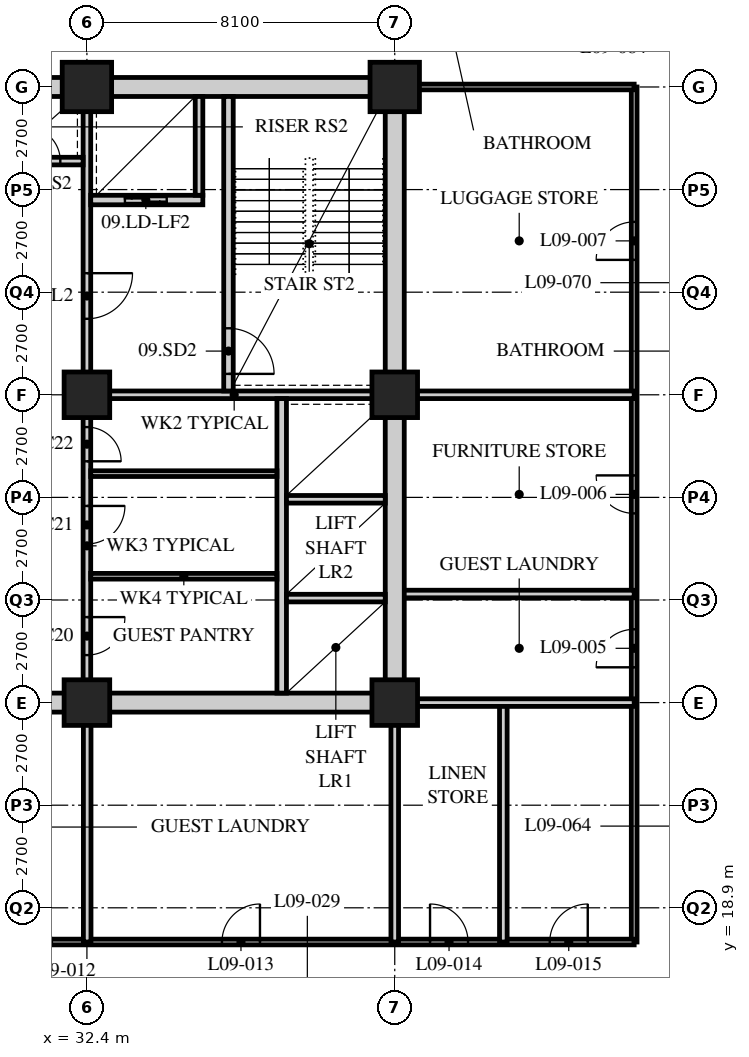
"""IFC4 building model, lengths in metres.
Left out: names, types, materials, properties, quantities, classifications, styles, units other than length and angle.
Written with IfcOpenShell. Run it as: python <this file> out.ifc"""

import sys

from ifc_helpers import new_model, si_unit, direction, frame, frame_2d, origin, origin_2d, place, context, subcontext, project, spatial, rectangle, hollow_rectangle, extrude, element, fill, save


model = new_model("IFC4")
c1 = context("Model", 3, precision=1e-05, world=origin(), true_north=direction((0.0, 1.0)))
c2 = subcontext(c1, "Body", "Model", "MODEL_VIEW")
j1 = project(units=[si_unit("LENGTHUNIT", "METRE"), si_unit("PLANEANGLEUNIT", "RADIAN")], contexts=[c1])
p1 = place(None, origin())
s1 = spatial("IfcSite", under=j1, at=p1, CompositionType="ELEMENT")
p2 = place(p1, origin())
s2 = spatial("IfcBuilding", under=s1, at=p2, CompositionType="ELEMENT")
p3 = place(p2, frame((0.0, 0.0, 43.2)))
s3 = spatial("IfcBuildingStorey", under=s2, at=p3, CompositionType="ELEMENT", Elevation=43.2)
for number, where, z_axis, x_axis in (
    (1, (32.4, 24.3, 0.0), (0.0, 0.0, 1.0), (1.0, 0.0, 0.0)),
    (2, (32.4, 32.4, 0.0), (0.0, 0.0, 1.0), (1.0, 0.0, 0.0)),
):
    element("IfcColumn", number, at=place(p3, frame(where, z_axis=z_axis, x_axis=x_axis)), inside=s3, PredefinedType="COLUMN", context=c2, shape_type="SweptSolid", body=[
        extrude(hollow_rectangle(XDim=1.2, YDim=1.2, WallThickness=0.12, at=origin_2d()), origin(), (0.0, 0.0, 1.0), 3.4),
    ])
p4 = place(p3, frame((32.4, 40.5, 0.0), z_axis=(0.0, 0.0, 1.0), x_axis=(1.0, 0.0, 0.0)))
e3 = element("IfcColumn", 3, at=p4, inside=s3, PredefinedType="COLUMN", context=c2, shape_type="SweptSolid", body=[
    extrude(hollow_rectangle(XDim=1.3, YDim=1.3, WallThickness=0.13, at=origin_2d()), origin(), (0.0, 0.0, 1.0), 3.4),
])
for number, where, z_axis, x_axis in (
    (4, (40.5, 24.3, 0.0), (0.0, 0.0, 1.0), (1.0, 0.0, 0.0)),
    (5, (40.5, 32.4, 0.0), (0.0, 0.0, 1.0), (1.0, 0.0, 0.0)),
):
    element("IfcColumn", number, at=place(p3, frame(where, z_axis=z_axis, x_axis=x_axis)), inside=s3, PredefinedType="COLUMN", context=c2, shape_type="SweptSolid", body=[
        extrude(hollow_rectangle(XDim=1.2, YDim=1.2, WallThickness=0.12, at=origin_2d()), origin(), (0.0, 0.0, 1.0), 3.4),
    ])
p5 = place(p3, frame((40.5, 40.5, 0.0), z_axis=(0.0, 0.0, 1.0), x_axis=(1.0, 0.0, 0.0)))
e6 = element("IfcColumn", 6, at=p5, inside=s3, PredefinedType="COLUMN", context=c2, shape_type="SweptSolid", body=[
    extrude(hollow_rectangle(XDim=1.3, YDim=1.3, WallThickness=0.13, at=origin_2d()), origin(), (0.0, 0.0, 1.0), 3.4),
])
p6 = place(p3, frame((46.8, 18.0, 0.0), z_axis=(0.0, 0.0, 1.0), x_axis=(0.0, 1.0, 0.0)))
e7 = element("IfcWall", 7, at=p6, inside=s3, PredefinedType="PARTITIONING", context=c2, shape_type="SweptSolid", body=[
    extrude(rectangle(XDim=22.5, YDim=0.15, at=frame_2d((11.25, 0.0))), origin(), (0.0, 0.0, 1.0), 3.19),
])
p7 = place(p6, frame((7.229, 0.0, 0.0)))
e8 = element("IfcOpeningElement", 8, at=p7, cuts=e7, PredefinedType="OPENING", context=c2, shape_type="SweptSolid", body=[
    extrude(rectangle(XDim=1.0, YDim=2.1, at=frame_2d((0.5, 1.05))), frame((0.0, 0.085, 0.0), z_axis=(0.0, -1.0, 0.0), x_axis=(1.0, 0.0, 0.0)), (0.0, 0.0, 1.0), 0.17),
])
p8 = place(p6, frame((11.279, 0.0, 0.0)))
e9 = element("IfcOpeningElement", 9, at=p8, cuts=e7, PredefinedType="OPENING", context=c2, shape_type="SweptSolid", body=[
    extrude(rectangle(XDim=1.0, YDim=2.1, at=frame_2d((0.5, 1.05))), frame((0.0, 0.085, 0.0), z_axis=(0.0, -1.0, 0.0), x_axis=(1.0, 0.0, 0.0)), (0.0, 0.0, 1.0), 0.17),
])
p9 = place(p6, frame((17.95, 0.0, 0.0)))
e10 = element("IfcOpeningElement", 10, at=p9, cuts=e7, PredefinedType="OPENING", context=c2, shape_type="SweptSolid", body=[
    extrude(rectangle(XDim=1.0, YDim=2.1, at=frame_2d((0.5, 1.05))), frame((0.0, 0.085, 0.0), z_axis=(0.0, -1.0, 0.0), x_axis=(1.0, 0.0, 0.0)), (0.0, 0.0, 1.0), 0.17),
])
p10 = place(p3, frame((46.8, 40.5, 0.0), z_axis=(0.0, 0.0, 1.0), x_axis=(-1.0, 0.0, 0.0)))
e11 = element("IfcWall", 11, at=p10, inside=s3, PredefinedType="PARTITIONING", context=c2, shape_type="SweptSolid", body=[
    extrude(rectangle(XDim=6.1, YDim=0.15, at=frame_2d((3.05, 0.0))), origin(), (0.0, 0.0, 1.0), 2.578),
])
p11 = place(p3, frame((29.56, 18.0, 0.0), z_axis=(0.0, 0.0, 1.0), x_axis=(1.0, 0.0, 0.0)))
e12 = element("IfcWall", 12, at=p11, inside=s3, PredefinedType="PARTITIONING", context=c2, shape_type="SweptSolid", body=[
    extrude(rectangle(XDim=17.24, YDim=0.15, at=frame_2d((8.62, 0.0))), origin(), (0.0, 0.0, 1.0), 3.19),
])
p12 = place(p11, frame((0.919, 0.0, 0.0)))
e13 = element("IfcOpeningElement", 13, at=p12, cuts=e12, PredefinedType="OPENING", context=c2, shape_type="SweptSolid", body=[
    extrude(rectangle(XDim=1.0, YDim=2.1, at=frame_2d((0.5, 1.05))), frame((0.0, 0.085, 0.0), z_axis=(0.0, -1.0, 0.0), x_axis=(1.0, 0.0, 0.0)), (0.0, 0.0, 1.0), 0.17),
])
p13 = place(p11, frame((6.394, 0.0, 0.0)))
e14 = element("IfcOpeningElement", 14, at=p13, cuts=e12, PredefinedType="OPENING", context=c2, shape_type="SweptSolid", body=[
    extrude(rectangle(XDim=1.0, YDim=2.1, at=frame_2d((0.5, 1.05))), frame((0.0, 0.085, 0.0), z_axis=(0.0, -1.0, 0.0), x_axis=(1.0, 0.0, 0.0)), (0.0, 0.0, 1.0), 0.17),
])
p14 = place(p11, frame((11.869, 0.0, 0.0)))
e15 = element("IfcOpeningElement", 15, at=p14, cuts=e12, PredefinedType="OPENING", context=c2, shape_type="SweptSolid", body=[
    extrude(rectangle(XDim=1.0, YDim=2.1, at=frame_2d((0.5, 1.05))), frame((0.0, 0.085, 0.0), z_axis=(0.0, -1.0, 0.0), x_axis=(1.0, 0.0, 0.0)), (0.0, 0.0, 1.0), 0.17),
])
p15 = place(p11, frame((15.019, 0.0, 0.0)))
e16 = element("IfcOpeningElement", 16, at=p15, cuts=e12, PredefinedType="OPENING", context=c2, shape_type="SweptSolid", body=[
    extrude(rectangle(XDim=1.0, YDim=2.1, at=frame_2d((0.5, 1.05))), frame((0.0, 0.085, 0.0), z_axis=(0.0, -1.0, 0.0), x_axis=(1.0, 0.0, 0.0)), (0.0, 0.0, 1.0), 0.17),
])
p16 = place(p3, frame((40.5, 32.4, 0.0), z_axis=(0.0, 0.0, 1.0), x_axis=(1.0, 0.0, 0.0)))
e17 = element("IfcWall", 17, at=p16, inside=s3, PredefinedType="SOLIDWALL", context=c2, shape_type="SweptSolid", body=[
    extrude(rectangle(XDim=6.3, YDim=0.2, at=frame_2d((3.15, 0.0))), origin(), (0.0, 0.0, 1.0), 2.578),
])
p17 = place(p3, frame((46.8, 27.157, 0.0), z_axis=(0.0, 0.0, 1.0), x_axis=(-1.0, 0.0, 0.0)))
e18 = element("IfcWall", 18, at=p17, inside=s3, PredefinedType="SOLIDWALL", context=c2, shape_type="SweptSolid", body=[
    extrude(rectangle(XDim=6.3, YDim=0.2, at=frame_2d((3.15, 0.0))), origin(), (0.0, 0.0, 1.0), 3.19),
])
for number, where, z_axis, x_axis in (
    (19, (40.5, 18.0, 0.0), (0.0, 0.0, 1.0), (0.0, 1.0, 0.0)),
    (20, (32.407, 18.0, 0.0), (0.0, 0.0, 1.0), (0.0, 1.0, 0.0)),
):
    element("IfcWall", number, at=place(p3, frame(where, z_axis=z_axis, x_axis=x_axis)), inside=s3, PredefinedType="SOLIDWALL", context=c2, shape_type="SweptSolid", body=[
        extrude(rectangle(XDim=6.3, YDim=0.2, at=frame_2d((3.15, 0.0))), origin(), (0.0, 0.0, 1.0), 2.578),
    ])
p18 = place(p3, frame((43.357, 18.0, 0.0), z_axis=(0.0, 0.0, 1.0), x_axis=(0.0, 1.0, 0.0)))
e21 = element("IfcWall", 21, at=p18, inside=s3, PredefinedType="SOLIDWALL", context=c2, shape_type="SweptSolid", body=[
    extrude(rectangle(XDim=6.3, YDim=0.2, at=frame_2d((3.15, 0.0))), origin(), (0.0, 0.0, 1.0), 3.19),
])
p19 = place(p3, frame((40.5, 24.3, 0.0), z_axis=(0.0, 0.0, 1.0), x_axis=(1.0, 0.0, 0.0)))
e22 = element("IfcWall", 22, at=p19, inside=s3, PredefinedType="SOLIDWALL", context=c2, shape_type="SweptSolid", body=[
    extrude(rectangle(XDim=6.3, YDim=0.2, at=frame_2d((3.15, 0.0))), origin(), (0.0, 0.0, 1.0), 2.578),
])
p20 = place(p3, frame((15.95, 24.3, 0.0), z_axis=(0.0, 0.0, 1.0), x_axis=(1.0, 0.0, 0.0)))
e23 = element("IfcWall", 23, at=p20, inside=s3, PredefinedType="SOLIDWALL", context=c2, shape_type="SweptSolid", body=[
    extrude(rectangle(XDim=24.8, YDim=0.5, at=frame_2d((12.4, 0.0))), origin(), (0.0, 0.0, 1.0), 2.54),
])
p21 = place(p20, frame((11.5, 0.0, 0.0)))
e24 = element("IfcOpeningElement", 24, at=p21, cuts=e23, PredefinedType="OPENING", context=c2, shape_type="SweptSolid", body=[
    extrude(rectangle(XDim=1.8, YDim=2.4, at=frame_2d((0.9, 1.2))), frame((0.0, 0.26, 0.0), z_axis=(0.0, -1.0, 0.0), x_axis=(1.0, 0.0, 0.0)), (0.0, 0.0, 1.0), 0.52),
])
p22 = place(p3, frame((15.95, 40.5, 0.0), z_axis=(0.0, 0.0, 1.0), x_axis=(1.0, 0.0, 0.0)))
e25 = element("IfcWall", 25, at=p22, inside=s3, PredefinedType="SOLIDWALL", context=c2, shape_type="SweptSolid", body=[
    extrude(rectangle(XDim=24.8, YDim=0.5, at=frame_2d((12.4, 0.0))), origin(), (0.0, 0.0, 1.0), 2.54),
])
p23 = place(p22, frame((11.5, 0.0, 0.0)))
e26 = element("IfcOpeningElement", 26, at=p23, cuts=e25, PredefinedType="OPENING", context=c2, shape_type="SweptSolid", body=[
    extrude(rectangle(XDim=1.8, YDim=2.4, at=frame_2d((0.9, 1.2))), frame((0.0, 0.26, 0.0), z_axis=(0.0, -1.0, 0.0), x_axis=(1.0, 0.0, 0.0)), (0.0, 0.0, 1.0), 0.52),
])
p24 = place(p3, frame((40.5, 24.55, 0.0), z_axis=(0.0, 0.0, 1.0), x_axis=(0.0, 1.0, 0.0)))
e27 = element("IfcWall", 27, at=p24, inside=s3, PredefinedType="SOLIDWALL", context=c2, shape_type="SweptSolid", body=[
    extrude(rectangle(XDim=15.7, YDim=0.5, at=frame_2d((7.85, 0.0))), origin(), (0.0, 0.0, 1.0), 2.578),
])
p25 = place(p3, frame((32.3, 32.4, 0.0), z_axis=(0.0, 0.0, 1.0), x_axis=(1.0, 0.0, 0.0)))
e28 = element("IfcWall", 28, at=p25, inside=s3, PredefinedType="SOLIDWALL", context=c2, shape_type="SweptSolid", body=[
    extrude(rectangle(XDim=7.95, YDim=0.2, at=frame_2d((3.975, 0.0))), origin(), (0.0, 0.0, 1.0), 2.578),
])
p26 = place(p3, frame((32.4, 32.5, 0.0), z_axis=(0.0, 0.0, 1.0), x_axis=(0.0, 1.0, 0.0)))
e29 = element("IfcWall", 29, at=p26, inside=s3, PredefinedType="SOLIDWALL", context=c2, shape_type="SweptSolid", body=[
    extrude(rectangle(XDim=7.75, YDim=0.2, at=frame_2d((3.875, 0.0))), origin(), (0.0, 0.0, 1.0), 2.578),
])
p27 = place(p26, frame((1.9, 0.0, 0.0)))
e30 = element("IfcOpeningElement", 30, at=p27, cuts=e29, PredefinedType="OPENING", context=c2, shape_type="SweptSolid", body=[
    extrude(rectangle(XDim=1.2, YDim=2.1, at=frame_2d((0.6, 1.05))), frame((0.0, 0.11, 0.0), z_axis=(0.0, -1.0, 0.0), x_axis=(1.0, 0.0, 0.0)), (0.0, 0.0, 1.0), 0.22),
])
p28 = place(p3, frame((37.525, 24.55, 0.0), z_axis=(0.0, 0.0, 1.0), x_axis=(0.0, 1.0, 0.0)))
e31 = element("IfcWall", 31, at=p28, inside=s3, PredefinedType="SOLIDWALL", context=c2, shape_type="SweptSolid", body=[
    extrude(rectangle(XDim=7.75, YDim=0.25, at=frame_2d((3.875, 0.0))), origin(), (0.0, 0.0, 1.0), 3.19),
])
for number, where, z_axis, x_axis in (
    (32, (37.65, 27.05, 0.0), (0.0, 0.0, 1.0), (1.0, 0.0, 0.0)),
    (33, (37.65, 29.65, 0.0), (0.0, 0.0, 1.0), (1.0, 0.0, 0.0)),
):
    element("IfcWall", number, at=place(p3, frame(where, z_axis=z_axis, x_axis=x_axis)), inside=s3, PredefinedType="SOLIDWALL", context=c2, shape_type="SweptSolid", body=[
        extrude(rectangle(XDim=2.6, YDim=0.2, at=frame_2d((1.3, 0.0))), origin(), (0.0, 0.0, 1.0), 3.19),
    ])
p29 = place(p3, frame((36.125, 32.5, 0.0), z_axis=(0.0, 0.0, 1.0), x_axis=(0.0, 1.0, 0.0)))
e34 = element("IfcWall", 34, at=p29, inside=s3, PredefinedType="SOLIDWALL", context=c2, shape_type="SweptSolid", body=[
    extrude(rectangle(XDim=7.75, YDim=0.25, at=frame_2d((3.875, 0.0))), origin(), (0.0, 0.0, 1.0), 3.19),
])
p30 = place(p29, frame((0.45, 0.0, 0.0)))
e35 = element("IfcOpeningElement", 35, at=p30, cuts=e34, PredefinedType="OPENING", context=c2, shape_type="SweptSolid", body=[
    extrude(rectangle(XDim=1.2, YDim=2.1, at=frame_2d((0.6, 1.05))), frame((0.0, 0.135, 0.0), z_axis=(0.0, -1.0, 0.0), x_axis=(1.0, 0.0, 0.0)), (0.0, 0.0, 1.0), 0.27),
])
p31 = place(p3, frame((32.5, 37.525, 0.0), z_axis=(0.0, 0.0, 1.0), x_axis=(1.0, 0.0, 0.0)))
e36 = element("IfcWall", 36, at=p31, inside=s3, PredefinedType="SOLIDWALL", context=c2, shape_type="SweptSolid", body=[
    extrude(rectangle(XDim=2.95, YDim=0.25, at=frame_2d((1.475, 0.0))), origin(), (0.0, 0.0, 1.0), 3.19),
])
p32 = place(p31, frame((0.9, 0.0, 0.0)))
e37 = element("IfcOpeningElement", 37, at=p32, cuts=e36, PredefinedType="OPENING", context=c2, shape_type="SweptSolid", body=[
    extrude(rectangle(XDim=1.1, YDim=2.4, at=frame_2d((0.55, 1.2))), frame((0.0, 0.135, 0.0), z_axis=(0.0, -1.0, 0.0), x_axis=(1.0, 0.0, 0.0)), (0.0, 0.0, 1.0), 0.27),
])
p33 = place(p3, frame((35.35, 37.65, 0.0), z_axis=(0.0, 0.0, 1.0), x_axis=(0.0, 1.0, 0.0)))
e38 = element("IfcWall", 38, at=p33, inside=s3, PredefinedType="SOLIDWALL", context=c2, shape_type="SweptSolid", body=[
    extrude(rectangle(XDim=2.6, YDim=0.2, at=frame_2d((1.3, 0.0))), origin(), (0.0, 0.0, 1.0), 3.19),
])
p34 = place(p3, frame((30.15, 38.55, 0.0), z_axis=(0.0, 0.0, 1.0), x_axis=(1.0, 0.0, 0.0)))
e39 = element("IfcWall", 39, at=p34, inside=s3, PredefinedType="SOLIDWALL", context=c2, shape_type="SweptSolid", body=[
    extrude(rectangle(XDim=2.15, YDim=0.2, at=frame_2d((1.075, 0.0))), origin(), (0.0, 0.0, 1.0), 3.19),
])
p35 = place(p34, frame((0.65, 0.0, 0.0)))
e40 = element("IfcOpeningElement", 40, at=p35, cuts=e39, PredefinedType="OPENING", context=c2, shape_type="SweptSolid", body=[
    extrude(rectangle(XDim=0.9, YDim=2.1, at=frame_2d((0.45, 1.05))), frame((0.0, 0.11, 0.0), z_axis=(0.0, -1.0, 0.0), x_axis=(1.0, 0.0, 0.0)), (0.0, 0.0, 1.0), 0.22),
])
p36 = place(p3, frame((32.4, 24.55, 0.0), z_axis=(0.0, 0.0, 1.0), x_axis=(0.0, 1.0, 0.0)))
e41 = element("IfcWall", 41, at=p36, inside=s3, PredefinedType="PARTITIONING", context=c2, shape_type="SweptSolid", body=[
    extrude(rectangle(XDim=7.75, YDim=0.2, at=frame_2d((3.875, 0.0))), origin(), (0.0, 0.0, 1.0), 2.578),
])
p37 = place(p36, frame((1.0, 0.0, 0.0)))
e42 = element("IfcOpeningElement", 42, at=p37, cuts=e41, PredefinedType="OPENING", context=c2, shape_type="SweptSolid", body=[
    extrude(rectangle(XDim=1.0, YDim=2.1, at=frame_2d((0.5, 1.05))), frame((0.0, 0.11, 0.0), z_axis=(0.0, -1.0, 0.0), x_axis=(1.0, 0.0, 0.0)), (0.0, 0.0, 1.0), 0.22),
])
p38 = place(p36, frame((3.925, 0.0, 0.0)))
e43 = element("IfcOpeningElement", 43, at=p38, cuts=e41, PredefinedType="OPENING", context=c2, shape_type="SweptSolid", body=[
    extrude(rectangle(XDim=1.0, YDim=2.1, at=frame_2d((0.5, 1.05))), frame((0.0, 0.11, 0.0), z_axis=(0.0, -1.0, 0.0), x_axis=(1.0, 0.0, 0.0)), (0.0, 0.0, 1.0), 0.22),
])
p39 = place(p36, frame((6.1, 0.0, 0.0)))
e44 = element("IfcOpeningElement", 44, at=p39, cuts=e41, PredefinedType="OPENING", context=c2, shape_type="SweptSolid", body=[
    extrude(rectangle(XDim=0.9, YDim=2.1, at=frame_2d((0.45, 1.05))), frame((0.0, 0.11, 0.0), z_axis=(0.0, -1.0, 0.0), x_axis=(1.0, 0.0, 0.0)), (0.0, 0.0, 1.0), 0.22),
])
for number, where, z_axis, x_axis in (
    (45, (32.5, 27.625, 0.0), (0.0, 0.0, 1.0), (1.0, 0.0, 0.0)),
    (46, (32.5, 30.325, 0.0), (0.0, 0.0, 1.0), (1.0, 0.0, 0.0)),
):
    element("IfcWall", number, at=place(p3, frame(where, z_axis=z_axis, x_axis=x_axis)), inside=s3, PredefinedType="PARTITIONING", context=c2, shape_type="SweptSolid", body=[
        extrude(rectangle(XDim=4.9, YDim=0.15, at=frame_2d((2.45, 0.0))), origin(), (0.0, 0.0, 1.0), 3.19),
    ])
p40 = place(p7, origin())
e47 = element("IfcDoor", 47, at=p40, inside=s3, OperationType="SINGLE_SWING_LEFT", PredefinedType="DOOR", context=c2, shape_type="SweptSolid", body=[
    extrude(rectangle(XDim=1.0, YDim=2.1, at=frame_2d((0.5, 1.05))), frame((0.0, 0.025, 0.0), z_axis=(0.0, -1.0, 0.0), x_axis=(1.0, 0.0, 0.0)), (0.0, 0.0, 1.0), 0.05),
])
fill(e8, e47)
p41 = place(p8, origin())
e48 = element("IfcDoor", 48, at=p41, inside=s3, OperationType="SINGLE_SWING_RIGHT", PredefinedType="DOOR", context=c2, shape_type="SweptSolid", body=[
    extrude(rectangle(XDim=1.0, YDim=2.1, at=frame_2d((0.5, 1.05))), frame((0.0, 0.025, 0.0), z_axis=(0.0, -1.0, 0.0), x_axis=(1.0, 0.0, 0.0)), (0.0, 0.0, 1.0), 0.05),
])
fill(e9, e48)
p42 = place(p9, origin())
e49 = element("IfcDoor", 49, at=p42, inside=s3, OperationType="SINGLE_SWING_LEFT", PredefinedType="DOOR", context=c2, shape_type="SweptSolid", body=[
    extrude(rectangle(XDim=1.0, YDim=2.1, at=frame_2d((0.5, 1.05))), frame((0.0, 0.025, 0.0), z_axis=(0.0, -1.0, 0.0), x_axis=(1.0, 0.0, 0.0)), (0.0, 0.0, 1.0), 0.05),
])
fill(e10, e49)
p43 = place(p13, origin())
e50 = element("IfcDoor", 50, at=p43, inside=s3, OperationType="SINGLE_SWING_RIGHT", PredefinedType="DOOR", context=c2, shape_type="SweptSolid", body=[
    extrude(rectangle(XDim=1.0, YDim=2.1, at=frame_2d((0.5, 1.05))), frame((0.0, 0.025, 0.0), z_axis=(0.0, -1.0, 0.0), x_axis=(1.0, 0.0, 0.0)), (0.0, 0.0, 1.0), 0.05),
])
fill(e14, e50)
p44 = place(p14, origin())
e51 = element("IfcDoor", 51, at=p44, inside=s3, OperationType="SINGLE_SWING_LEFT", PredefinedType="DOOR", context=c2, shape_type="SweptSolid", body=[
    extrude(rectangle(XDim=1.0, YDim=2.1, at=frame_2d((0.5, 1.05))), frame((0.0, 0.025, 0.0), z_axis=(0.0, -1.0, 0.0), x_axis=(1.0, 0.0, 0.0)), (0.0, 0.0, 1.0), 0.05),
])
fill(e15, e51)
p45 = place(p15, origin())
e52 = element("IfcDoor", 52, at=p45, inside=s3, OperationType="SINGLE_SWING_RIGHT", PredefinedType="DOOR", context=c2, shape_type="SweptSolid", body=[
    extrude(rectangle(XDim=1.0, YDim=2.1, at=frame_2d((0.5, 1.05))), frame((0.0, 0.025, 0.0), z_axis=(0.0, -1.0, 0.0), x_axis=(1.0, 0.0, 0.0)), (0.0, 0.0, 1.0), 0.05),
])
fill(e16, e52)
p46 = place(p37, origin())
e53 = element("IfcDoor", 53, at=p46, inside=s3, OperationType="SINGLE_SWING_LEFT", PredefinedType="DOOR", context=c2, shape_type="SweptSolid", body=[
    extrude(rectangle(XDim=1.0, YDim=2.1, at=frame_2d((0.5, 1.05))), frame((0.0, 0.025, 0.0), z_axis=(0.0, -1.0, 0.0), x_axis=(1.0, 0.0, 0.0)), (0.0, 0.0, 1.0), 0.05),
])
fill(e42, e53)
p47 = place(p38, origin())
e54 = element("IfcDoor", 54, at=p47, inside=s3, OperationType="SINGLE_SWING_LEFT", PredefinedType="DOOR", context=c2, shape_type="SweptSolid", body=[
    extrude(rectangle(XDim=1.0, YDim=2.1, at=frame_2d((0.5, 1.05))), frame((0.0, 0.025, 0.0), z_axis=(0.0, -1.0, 0.0), x_axis=(1.0, 0.0, 0.0)), (0.0, 0.0, 1.0), 0.05),
])
fill(e43, e54)
p48 = place(p39, origin())
e55 = element("IfcDoor", 55, at=p48, inside=s3, OperationType="SINGLE_SWING_RIGHT", PredefinedType="DOOR", context=c2, shape_type="SweptSolid", body=[
    extrude(rectangle(XDim=0.9, YDim=2.1, at=frame_2d((0.45, 1.05))), frame((0.0, 0.025, 0.0), z_axis=(0.0, -1.0, 0.0), x_axis=(1.0, 0.0, 0.0)), (0.0, 0.0, 1.0), 0.05),
])
fill(e44, e55)
p49 = place(p30, origin())
e56 = element("IfcDoor", 56, at=p49, inside=s3, OperationType="SINGLE_SWING_RIGHT", PredefinedType="DOOR", context=c2, shape_type="SweptSolid", body=[
    extrude(rectangle(XDim=1.2, YDim=2.1, at=frame_2d((0.6, 1.05))), frame((0.0, 0.025, 0.0), z_axis=(0.0, -1.0, 0.0), x_axis=(1.0, 0.0, 0.0)), (0.0, 0.0, 1.0), 0.05),
])
fill(e35, e56)
p50 = place(p27, origin())
e57 = element("IfcDoor", 57, at=p50, inside=s3, OperationType="SINGLE_SWING_LEFT", PredefinedType="DOOR", context=c2, shape_type="SweptSolid", body=[
    extrude(rectangle(XDim=1.2, YDim=2.1, at=frame_2d((0.6, 1.05))), frame((0.0, 0.025, 0.0), z_axis=(0.0, -1.0, 0.0), x_axis=(1.0, 0.0, 0.0)), (0.0, 0.0, 1.0), 0.05),
])
fill(e30, e57)
p51 = place(p35, origin())
e58 = element("IfcDoor", 58, at=p51, inside=s3, OperationType="SINGLE_SWING_LEFT", PredefinedType="DOOR", context=c2, shape_type="SweptSolid", body=[
    extrude(rectangle(XDim=0.9, YDim=2.1, at=frame_2d((0.45, 1.05))), frame((0.0, 0.025, 0.0), z_axis=(0.0, -1.0, 0.0), x_axis=(1.0, 0.0, 0.0)), (0.0, 0.0, 1.0), 0.05),
])
fill(e40, e58)
p52 = place(p32, origin())
e59 = element("IfcDoor", 59, at=p52, inside=s3, OperationType="DOUBLE_DOOR_SLIDING", PredefinedType="DOOR", context=c2, shape_type="SweptSolid", body=[
    extrude(rectangle(XDim=1.1, YDim=2.4, at=frame_2d((0.55, 1.2))), frame((0.0, 0.025, 0.0), z_axis=(0.0, -1.0, 0.0), x_axis=(1.0, 0.0, 0.0)), (0.0, 0.0, 1.0), 0.05),
])
fill(e37, e59)
save(model, sys.argv[1])
